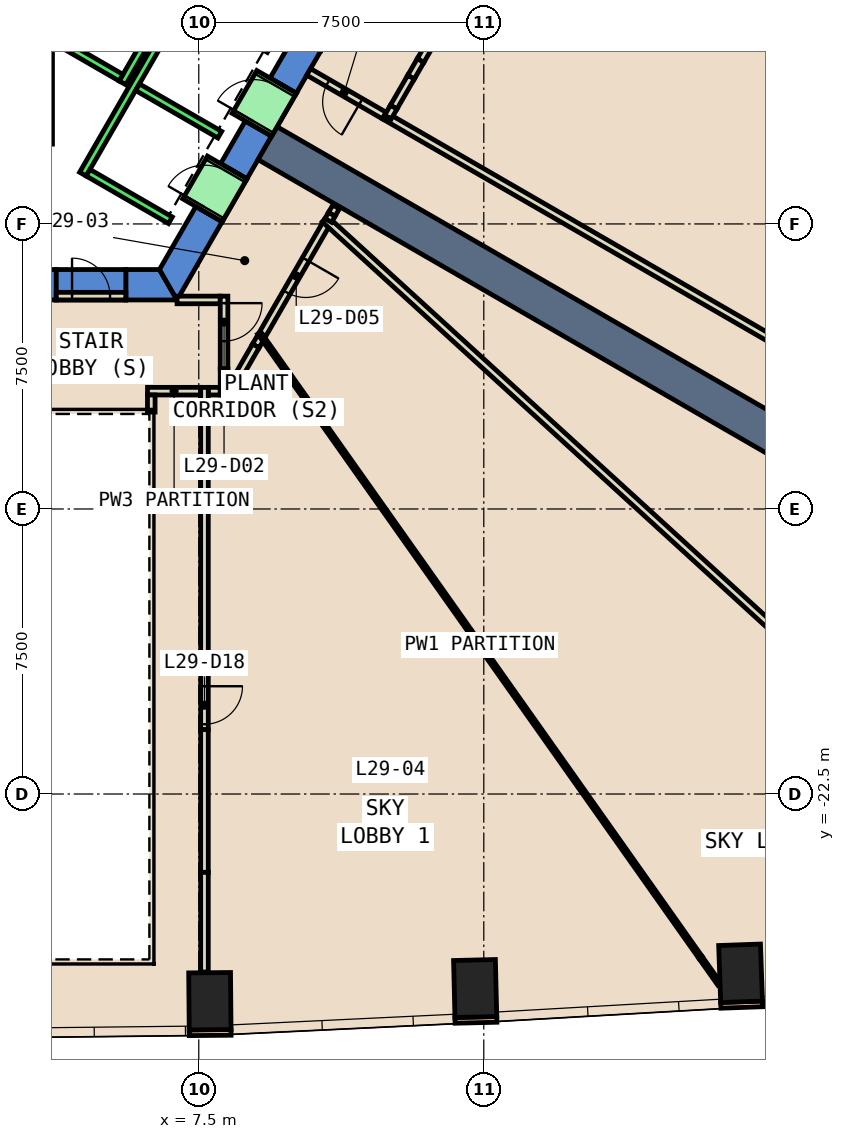
"""IFC4 building model, lengths in metres.
Left out: names, types, materials, properties, quantities, classifications, styles, units other than length and angle.
Written with IfcOpenShell. Run it as: python <this file> out.ifc"""

import sys

from ifc_helpers import new_model, si_unit, direction, frame, frame_2d, origin, origin_2d, place, context, subcontext, project, spatial, polyline, rectangle, outline, extrude, element, fill, save


model = new_model("IFC4")
c1 = context("Model", 3, precision=1e-05, world=origin(), true_north=direction((0.0, 1.0)))
c2 = subcontext(c1, "Body", "Model", "MODEL_VIEW")
j1 = project(units=[si_unit("LENGTHUNIT", "METRE"), si_unit("PLANEANGLEUNIT", "RADIAN")], contexts=[c1])
p1 = place(None, origin())
s1 = spatial("IfcSite", under=j1, at=p1, CompositionType="ELEMENT")
p2 = place(p1, origin())
s2 = spatial("IfcBuilding", under=s1, at=p2, CompositionType="ELEMENT")
p3 = place(p2, frame((0.0, 0.0, 132.8)))
s3 = spatial("IfcBuildingStorey", under=s2, at=p3, CompositionType="ELEMENT", Elevation=132.8)
for number, where, z_axis, x_axis in (
    (1, (7.792, -27.952, -0.6), (0.0, 0.0, 1.0), (1.0, 0.009, 0.0)),
    (2, (14.773, -27.618, -0.6), (0.0, 0.0, 1.0), (1.0, 0.024, 0.0)),
    (3, (21.757, -27.217, -0.6), (0.0, 0.0, 1.0), (0.999, 0.035, 0.0)),
):
    element("IfcColumn", number, at=place(p3, frame(where, z_axis=z_axis, x_axis=x_axis)), inside=s3, PredefinedType="COLUMN", context=c2, shape_type="SweptSolid", body=[
        extrude(rectangle(XDim=1.1, YDim=1.5, at=origin_2d()), origin(), (0.0, 0.0, 1.0), 5.4),
    ])
p4 = place(p3, frame((0.0, 0.0, -0.6)))
e4 = element("IfcWall", 4, at=p4, inside=s3, PredefinedType="SHEAR", context=c2, shape_type="SweptSolid", body=[
    extrude(outline(polyline([(3.75, -9.5), (3.75, -8.7), (-6.466, -8.7), (-6.928, -9.5), (3.75, -9.5)])), origin(), (0.0, 0.0, 1.0), 5.4),
])
p5 = place(p3, frame((0.0, 0.0, -0.6)))
e5 = element("IfcWall", 5, at=p5, inside=s3, PredefinedType="SHEAR", context=c2, shape_type="SweptSolid", body=[
    extrude(outline(polyline([(5.58, -8.7), (5.58, -9.5), (6.928, -9.5), (6.466, -8.7), (5.58, -8.7)])), origin(), (0.0, 0.0, 1.0), 5.4),
])
p6 = place(p3, frame((0.0, 0.0, 3.6)))
e6 = element("IfcWall", 6, at=p6, inside=s3, PredefinedType="SHEAR", context=c2, shape_type="SweptSolid", body=[
    extrude(outline(polyline([(5.58, -9.5), (5.58, -8.7), (3.75, -8.7), (3.75, -9.5), (5.58, -9.5)])), origin(), (0.0, 0.0, 1.0), 1.2),
])
p7 = place(p3, frame((0.0, 0.0, -0.6)))
e7 = element("IfcWall", 7, at=p7, inside=s3, PredefinedType="SHEAR", context=c2, shape_type="SweptSolid", body=[
    extrude(outline(polyline([(8.117, -7.44), (7.424, -7.04), (6.466, -8.7), (6.928, -9.5), (8.117, -7.44)])), origin(), (0.0, 0.0, 1.0), 5.4),
])
p8 = place(p3, frame((0.0, 0.0, -0.6)))
e8 = element("IfcWall", 8, at=p8, inside=s3, PredefinedType="SHEAR", context=c2, shape_type="SweptSolid", body=[
    extrude(outline(polyline([(9.417, -5.189), (8.724, -4.789), (8.075, -5.914), (8.767, -6.314), (9.417, -5.189)])), origin(), (0.0, 0.0, 1.0), 5.4),
])
p9 = place(p3, frame((0.0, 0.0, -0.6)))
e9 = element("IfcWall", 9, at=p9, inside=s3, PredefinedType="SHEAR", context=c2, shape_type="SweptSolid", body=[
    extrude(outline(polyline([(10.717, -2.937), (10.025, -2.537), (9.374, -3.663), (10.067, -4.063), (10.717, -2.937)])), origin(), (0.0, 0.0, 1.0), 5.4),
])
p10 = place(p3, frame((0.0, 0.0, 3.6)))
e10 = element("IfcWall", 10, at=p10, inside=s3, PredefinedType="SHEAR", context=c2, shape_type="SweptSolid", body=[
    extrude(outline(polyline([(8.767, -6.314), (8.075, -5.914), (7.424, -7.04), (8.117, -7.44), (8.767, -6.314)])), origin(), (0.0, 0.0, 1.0), 1.2),
])
p11 = place(p3, frame((0.0, 0.0, 3.6)))
e11 = element("IfcWall", 11, at=p11, inside=s3, PredefinedType="SHEAR", context=c2, shape_type="SweptSolid", body=[
    extrude(outline(polyline([(10.067, -4.063), (9.374, -3.663), (8.724, -4.789), (9.417, -5.189), (10.067, -4.063)])), origin(), (0.0, 0.0, 1.0), 1.2),
])
p12 = place(p3, frame((9.31, -5.375, 0.0), z_axis=(0.0, 0.0, 1.0), x_axis=(0.86602173752, -0.500006350103, 0.0)))
e12 = element("IfcWall", 12, at=p12, inside=s3, PredefinedType="SHEAR", context=c2, shape_type="SweptSolid", body=[
    extrude(rectangle(XDim=31.463, YDim=1.0, at=frame_2d((15.732, 0.0))), origin(), (0.0, 0.0, 1.0), 4.8),
])
p13 = place(p3, frame((7.249, -28.782, 0.0), z_axis=(0.0, 0.0, 1.0), x_axis=(0.99995860686, 0.009098602504, 0.0)))
e13 = element("IfcWall", 13, at=p13, inside=s3, PredefinedType="STANDARD", context=c2, shape_type="SweptSolid", body=[
    extrude(rectangle(XDim=1.1, YDim=0.15, at=frame_2d((0.55, 0.0))), origin(), (0.0, 0.0, 1.0), 4.8),
])
p14 = place(p3, frame((14.243, -28.456, 0.0), z_axis=(0.0, 0.0, 1.0), x_axis=(0.999718180159, 0.023739424163, 0.0)))
e14 = element("IfcWall", 14, at=p14, inside=s3, PredefinedType="STANDARD", context=c2, shape_type="SweptSolid", body=[
    extrude(rectangle(XDim=1.1, YDim=0.15, at=frame_2d((0.55, 0.0))), origin(), (0.0, 0.0, 1.0), 4.8),
])
p15 = place(p3, frame((21.237, -28.061, 0.0), z_axis=(0.0, 0.0, 1.0), x_axis=(0.999368780235, 0.035525217693, 0.0)))
e15 = element("IfcWall", 15, at=p15, inside=s3, PredefinedType="STANDARD", context=c2, shape_type="SweptSolid", body=[
    extrude(rectangle(XDim=1.1, YDim=0.15, at=frame_2d((0.55, 0.0))), origin(), (0.0, 0.0, 1.0), 4.8),
])
p16 = place(p3, frame((7.55, -11.9, 0.0), z_axis=(0.0, 0.0, 1.0), x_axis=(-1.0, 0.0, 0.0)))
e16 = element("IfcWall", 16, at=p16, inside=s3, PredefinedType="PARTITIONING", context=c2, shape_type="SweptSolid", body=[
    extrude(rectangle(XDim=1.399, YDim=0.2, at=frame_2d((0.7, 0.0))), origin(), (0.0, 0.0, 1.0), 4.8),
])
p17 = place(p3, frame((6.25, -12.0, 0.0), z_axis=(0.0, 0.0, 1.0), x_axis=(0.0, -1.0, 0.0)))
e17 = element("IfcWall", 17, at=p17, inside=s3, PredefinedType="PARTITIONING", context=c2, shape_type="SweptSolid", body=[
    extrude(rectangle(XDim=0.45, YDim=0.2, at=frame_2d((0.225, 0.0))), origin(), (0.0, 0.0, 1.0), 4.8),
])
p18 = place(p3, frame((6.928, -9.5, 0.0), z_axis=(0.0, 0.0, 1.0), x_axis=(1.0, 0.0, 0.0)))
e18 = element("IfcWall", 18, at=p18, inside=s3, PredefinedType="PARTITIONING", context=c2, shape_type="SweptSolid", body=[
    extrude(rectangle(XDim=1.137, YDim=0.2, at=frame_2d((0.568, 0.0))), origin(), (0.0, 0.0, 1.0), 2.4),
])
p19 = place(p3, frame((8.165, -9.4, 0.0), z_axis=(0.0, 0.0, 1.0), x_axis=(0.0, -1.0, 0.0)))
e19 = element("IfcWall", 19, at=p19, inside=s3, PredefinedType="PARTITIONING", context=c2, shape_type="SweptSolid", body=[
    extrude(rectangle(XDim=1.914, YDim=0.2, at=frame_2d((0.957, 0.0))), origin(), (0.0, 0.0, 1.0), 2.4),
])
p20 = place(p19, frame((0.184, 0.0, 0.0)))
e20 = element("IfcOpeningElement", 20, at=p20, cuts=e19, PredefinedType="OPENING", context=c2, shape_type="SweptSolid", body=[
    extrude(rectangle(XDim=1.0, YDim=2.1, at=frame_2d((0.5, 1.05))), frame((0.0, 0.11, 0.0), z_axis=(0.0, -1.0, 0.0), x_axis=(1.0, 0.0, 0.0)), (0.0, 0.0, 1.0), 0.22),
])
p21 = place(p3, frame((8.065, -11.9, 0.0), z_axis=(0.0, 0.0, 1.0), x_axis=(-1.0, 0.0, 0.0)))
e21 = element("IfcWall", 21, at=p21, inside=s3, PredefinedType="PARTITIONING", context=c2, shape_type="SweptSolid", body=[
    extrude(rectangle(XDim=0.315, YDim=0.2, at=frame_2d((0.157, 0.0))), origin(), (0.0, 0.0, 1.0), 4.8),
])
p22 = place(p3, frame((7.65, -11.8, 0.0), z_axis=(0.0, 0.0, 1.0), x_axis=(0.0, -1.0, 0.0)))
e22 = element("IfcWall", 22, at=p22, inside=s3, PredefinedType="PARTITIONING", context=c2, shape_type="SweptSolid", body=[
    extrude(rectangle(XDim=9.006, YDim=0.2, at=frame_2d((4.503, 0.0))), origin(), (0.0, 0.0, 1.0), 4.8),
])
p23 = place(p22, frame((7.864, 0.0, 0.0)))
e23 = element("IfcOpeningElement", 23, at=p23, cuts=e22, PredefinedType="OPENING", context=c2, shape_type="SweptSolid", body=[
    extrude(rectangle(XDim=1.0, YDim=2.1, at=frame_2d((0.5, 1.05))), frame((0.0, 0.11, 0.0), z_axis=(0.0, -1.0, 0.0), x_axis=(1.0, 0.0, 0.0)), (0.0, 0.0, 1.0), 0.22),
])
p24 = place(p3, frame((9.145, -10.46, 0.0), z_axis=(0.0, 0.0, 1.0), x_axis=(-0.500701704226, -0.865619895442, 0.0)))
e24 = element("IfcWall", 24, at=p24, inside=s3, PredefinedType="PARTITIONING", context=c2, shape_type="SweptSolid", body=[
    extrude(rectangle(XDim=0.288, YDim=0.2, at=frame_2d((0.144, 0.0))), origin(), (0.0, 0.0, 1.0), 4.8),
])
p25 = place(p3, frame((10.89, -7.437, 0.0), z_axis=(0.0, 0.0, 1.0), x_axis=(-0.499905227862, -0.86608011359, 0.0)))
e25 = element("IfcWall", 25, at=p25, inside=s3, PredefinedType="PARTITIONING", context=c2, shape_type="SweptSolid", body=[
    extrude(rectangle(XDim=3.43, YDim=0.2, at=frame_2d((1.715, 0.0))), origin(), (0.0, 0.0, 1.0), 4.8),
])
p26 = place(p25, frame((1.152, 0.0, 0.0)))
e26 = element("IfcOpeningElement", 26, at=p26, cuts=e25, PredefinedType="OPENING", context=c2, shape_type="SweptSolid", body=[
    extrude(rectangle(XDim=1.0, YDim=2.1, at=frame_2d((0.5, 1.05))), frame((0.0, 0.11, 0.0), z_axis=(0.0, -1.0, 0.0), x_axis=(1.0, 0.0, 0.0)), (0.0, 0.0, 1.0), 0.22),
])
p27 = place(p3, frame((11.113, -7.051, 0.0), z_axis=(0.0, 0.0, 1.0), x_axis=(-0.499504513693, -0.866311284008, 0.0)))
e27 = element("IfcWall", 27, at=p27, inside=s3, PredefinedType="PARTITIONING", context=c2, shape_type="SweptSolid", body=[
    extrude(rectangle(XDim=0.226, YDim=0.2, at=frame_2d((0.113, 0.0))), origin(), (0.0, 0.0, 1.0), 2.1),
])
p28 = place(p3, frame((9.092, -10.37, 0.0), z_axis=(0.0, 0.0, 1.0), x_axis=(0.577122389033, -0.816657668841, 0.0)))
e28 = element("IfcWall", 28, at=p28, inside=s3, PredefinedType="PARTITIONING", context=c2, shape_type="SweptSolid", body=[
    extrude(rectangle(XDim=20.118, YDim=0.1, at=frame_2d((10.059, 0.0))), origin(), (0.0, 0.0, 1.0), 4.8),
])
p29 = place(p3, frame((10.816, -7.37, 0.0), z_axis=(0.0, 0.0, 1.0), x_axis=(0.738728492096, -0.674003126822, 0.0)))
e29 = element("IfcWall", 29, at=p29, inside=s3, PredefinedType="PARTITIONING", context=c2, shape_type="SweptSolid", body=[
    extrude(rectangle(XDim=27.445, YDim=0.2, at=frame_2d((13.722, 0.0))), origin(), (0.0, 0.0, 1.0), 4.8),
])
p30 = place(p3, frame((12.384, -4.65, 0.0), z_axis=(0.0, 0.0, 1.0), x_axis=(-0.866053019151, 0.499952165731, 0.0)))
e30 = element("IfcWall", 30, at=p30, inside=s3, PredefinedType="PARTITIONING", context=c2, shape_type="SweptSolid", body=[
    extrude(rectangle(XDim=2.3, YDim=0.2, at=frame_2d((1.15, 0.0))), origin(), (0.0, 0.0, 1.0), 4.8),
])
p31 = place(p30, frame((0.721, 0.0, 0.0)))
e31 = element("IfcOpeningElement", 31, at=p31, cuts=e30, PredefinedType="OPENING", context=c2, shape_type="SweptSolid", body=[
    extrude(rectangle(XDim=1.0, YDim=2.1, at=frame_2d((0.5, 1.05))), frame((0.0, 0.11, 0.0), z_axis=(0.0, -1.0, 0.0), x_axis=(1.0, 0.0, 0.0)), (0.0, 0.0, 1.0), 0.22),
])
p32 = place(p3, frame((12.384, -4.65, 0.0), z_axis=(0.0, 0.0, 1.0), x_axis=(0.866033509011, -0.499985961072, 0.0)))
e32 = element("IfcWall", 32, at=p32, inside=s3, PredefinedType="PARTITIONING", context=c2, shape_type="SweptSolid", body=[
    extrude(rectangle(XDim=29.487, YDim=0.2, at=frame_2d((14.744, 0.0))), origin(), (0.0, 0.0, 1.0), 4.8),
])
p33 = place(p3, frame((3.75, -9.4, 0.0), z_axis=(0.0, 0.0, 1.0), x_axis=(1.0, 0.0, 0.0)))
e33 = element("IfcWall", 33, at=p33, inside=s3, PredefinedType="PARTITIONING", context=c2, shape_type="SweptSolid", body=[
    extrude(rectangle(XDim=1.83, YDim=0.2, at=frame_2d((0.915, 0.0))), origin(), (0.0, 0.0, 1.0), 2.4),
])
p34 = place(p33, frame((0.415, 0.0, 0.0)))
e34 = element("IfcOpeningElement", 34, at=p34, cuts=e33, PredefinedType="OPENING", context=c2, shape_type="SweptSolid", body=[
    extrude(rectangle(XDim=1.0, YDim=2.1, at=frame_2d((0.5, 1.05))), frame((0.0, 0.11, 0.0), z_axis=(0.0, -1.0, 0.0), x_axis=(1.0, 0.0, 0.0)), (0.0, 0.0, 1.0), 0.22),
])
p35 = place(p3, frame((8.165, -11.314, 0.0), z_axis=(0.0, 0.0, 1.0), x_axis=(0.0, -1.0, 0.0)))
e35 = element("IfcWall", 35, at=p35, inside=s3, PredefinedType="PARTITIONING", context=c2, shape_type="SweptSolid", body=[
    extrude(rectangle(XDim=0.686, YDim=0.2, at=frame_2d((0.343, 0.0))), origin(), (0.0, 0.0, 1.0), 4.8),
])
p36 = place(p3, frame((7.65, -20.806, 0.0), z_axis=(0.0, 0.0, 1.0), x_axis=(0.0, -1.0, 0.0)))
e36 = element("IfcWall", 36, at=p36, inside=s3, PredefinedType="PARTITIONING", context=c2, shape_type="SweptSolid", body=[
    extrude(rectangle(XDim=3.755, YDim=0.2, at=frame_2d((1.877, 0.0))), origin(), (0.0, 0.0, 1.0), 2.4),
])
p37 = place(p3, frame((7.65, -24.561, 0.0), z_axis=(0.0, 0.0, 1.0), x_axis=(0.0, -1.0, 0.0)))
e37 = element("IfcWall", 37, at=p37, inside=s3, PredefinedType="PARTITIONING", context=c2, shape_type="SweptSolid", body=[
    extrude(rectangle(XDim=2.622, YDim=0.2, at=frame_2d((1.311, 0.0))), origin(), (0.0, 0.0, 1.0), 4.8),
])
p38 = place(p3, frame((9.001, -10.709, 0.0), z_axis=(0.0, 0.0, 1.0), x_axis=(-0.499753940741, -0.866167419564, 0.0)))
e38 = element("IfcWall", 38, at=p38, inside=s3, PredefinedType="PARTITIONING", context=c2, shape_type="SweptSolid", body=[
    extrude(rectangle(XDim=1.119, YDim=0.2, at=frame_2d((0.559, 0.0))), origin(), (0.0, 0.0, 1.0), 2.4),
])
p39 = place(p3, frame((8.442, -11.678, 0.0), z_axis=(0.0, 0.0, 1.0), x_axis=(-0.499011179969, -0.866595547107, 0.0)))
e39 = element("IfcWall", 39, at=p39, inside=s3, PredefinedType="PARTITIONING", context=c2, shape_type="SweptSolid", body=[
    extrude(rectangle(XDim=0.357, YDim=0.2, at=frame_2d((0.178, 0.0))), origin(), (0.0, 0.0, 1.0), 4.8),
])
p40 = place(p3, frame((11.0, -7.247, 0.0), z_axis=(0.0, 0.0, 1.0), x_axis=(-0.498843983803, -0.866691802098, 0.0)))
e40 = element("IfcWall", 40, at=p40, inside=s3, PredefinedType="PARTITIONING", context=c2, shape_type="SweptSolid", body=[
    extrude(rectangle(XDim=0.185, YDim=0.2, at=frame_2d((0.092, 0.0))), origin(), (0.0, 0.0, 1.0), 4.8),
])
p41 = place(p3, frame((20.703, -26.8, 0.0), z_axis=(0.0, 0.0, 1.0), x_axis=(0.577265327721, -0.816556636989, 0.0)))
e41 = element("IfcWall", 41, at=p41, inside=s3, PredefinedType="PARTITIONING", context=c2, shape_type="SweptSolid", body=[
    extrude(rectangle(XDim=0.856, YDim=0.1, at=frame_2d((0.428, 0.0))), origin(), (0.0, 0.0, 1.0), 2.4),
])
p42 = place(p3, frame((13.806, -2.387, 0.0), z_axis=(0.0, 0.0, 1.0), x_axis=(-0.499572668549, -0.866271983178, 0.0)))
e42 = element("IfcWall", 42, at=p42, inside=s3, PredefinedType="PARTITIONING", context=c2, shape_type="SweptSolid", body=[
    extrude(rectangle(XDim=0.941, YDim=0.2, at=frame_2d((0.47, 0.0))), origin(), (0.0, 0.0, 1.0), 2.4),
])
p43 = place(p3, frame((13.336, -3.202, 0.0), z_axis=(0.0, 0.0, 1.0), x_axis=(-0.499694399542, -0.866201770413, 0.0)))
e43 = element("IfcWall", 43, at=p43, inside=s3, PredefinedType="PARTITIONING", context=c2, shape_type="SweptSolid", body=[
    extrude(rectangle(XDim=0.502, YDim=0.2, at=frame_2d((0.251, 0.0))), origin(), (0.0, 0.0, 1.0), 4.8),
])
p44 = place(p3, frame((13.085, -3.637, 0.0), z_axis=(0.0, 0.0, 1.0), x_axis=(-0.500402557727, -0.865792862191, 0.0)))
e44 = element("IfcWall", 44, at=p44, inside=s3, PredefinedType="PARTITIONING", context=c2, shape_type="SweptSolid", body=[
    extrude(rectangle(XDim=0.911, YDim=0.2, at=frame_2d((0.456, 0.0))), origin(), (0.0, 0.0, 1.0), 2.1),
])
p45 = place(p3, frame((12.629, -4.426, 0.0), z_axis=(0.0, 0.0, 1.0), x_axis=(-0.500493465029, -0.865740314103, 0.0)))
e45 = element("IfcWall", 45, at=p45, inside=s3, PredefinedType="PARTITIONING", context=c2, shape_type="SweptSolid", body=[
    extrude(rectangle(XDim=0.302, YDim=0.2, at=frame_2d((0.151, 0.0))), origin(), (0.0, 0.0, 1.0), 4.8),
])
p46 = place(p3, frame((5.492, -3.788, 0.0), z_axis=(0.0, 0.0, 1.0), x_axis=(0.500011755427, 0.866018616679, 0.0)))
e46 = element("IfcWall", 46, at=p46, inside=s3, PredefinedType="STANDARD", context=c2, shape_type="SweptSolid", body=[
    extrude(rectangle(XDim=2.8, YDim=0.2, at=frame_2d((1.4, 0.0))), origin(), (0.0, 0.0, 1.0), 4.8),
])
p47 = place(p3, frame((3.377, -2.452, 0.0), z_axis=(0.0, 0.0, 1.0), x_axis=(0.865955154139, -0.50012165622, 0.0)))
e47 = element("IfcWall", 47, at=p47, inside=s3, PredefinedType="STANDARD", context=c2, shape_type="SweptSolid", body=[
    extrude(rectangle(XDim=2.4, YDim=0.2, at=frame_2d((1.2, 0.0))), origin(), (0.0, 0.0, 1.0), 4.8),
])
p48 = place(p3, frame((4.451, -6.19, 0.0), z_axis=(0.0, 0.0, 1.0), x_axis=(0.50000090737, 0.866024879913, 0.0)))
e48 = element("IfcWall", 48, at=p48, inside=s3, PredefinedType="STANDARD", context=c2, shape_type="SweptSolid", body=[
    extrude(rectangle(XDim=10.6, YDim=0.2, at=frame_2d((5.3, 0.0))), origin(), (0.0, 0.0, 1.0), 4.8),
])
for number, where, z_axis, x_axis in (
    (49, (4.588, -6.153, 0.0), (0.0, 0.0, 1.0), (0.866, -0.5, 0.0)),
    (50, (5.888, -3.902, 0.0), (0.0, 0.0, 1.0), (0.866, -0.5, 0.0)),
):
    element("IfcWall", number, at=place(p3, frame(where, z_axis=z_axis, x_axis=x_axis)), inside=s3, PredefinedType="STANDARD", context=c2, shape_type="SweptSolid", body=[
        extrude(rectangle(XDim=2.5, YDim=0.2, at=frame_2d((1.25, 0.0))), origin(), (0.0, 0.0, 1.0), 4.8),
    ])
p49 = place(p3, frame((7.598, -7.14, 0.0), z_axis=(0.0, 0.0, 1.0), x_axis=(0.500362116554, 0.865816234728, 0.0)))
e51 = element("IfcWall", 51, at=p49, inside=s3, PredefinedType="STANDARD", context=c2, shape_type="SweptSolid", body=[
    extrude(rectangle(XDim=1.299, YDim=1.2, at=frame_2d((0.65, 0.0))), origin(), (0.0, 0.0, 1.0), 2.4),
])
p50 = place(p49, frame((0.1, 0.0, 0.0)))
e52 = element("IfcOpeningElement", 52, at=p50, cuts=e51, PredefinedType="OPENING", context=c2, shape_type="SweptSolid", body=[
    extrude(rectangle(XDim=1.1, YDim=2.3, at=frame_2d((0.55, 1.15))), frame((0.0, 0.61, 0.0), z_axis=(0.0, -1.0, 0.0), x_axis=(1.0, 0.0, 0.0)), (0.0, 0.0, 1.0), 1.22),
])
p51 = place(p3, frame((8.898, -4.889, 0.0), z_axis=(0.0, 0.0, 1.0), x_axis=(0.500036693733, 0.866004217611, 0.0)))
e53 = element("IfcWall", 53, at=p51, inside=s3, PredefinedType="STANDARD", context=c2, shape_type="SweptSolid", body=[
    extrude(rectangle(XDim=1.3, YDim=1.2, at=frame_2d((0.65, 0.0))), origin(), (0.0, 0.0, 1.0), 2.4),
])
p52 = place(p51, frame((0.1, 0.0, 0.0)))
e54 = element("IfcOpeningElement", 54, at=p52, cuts=e53, PredefinedType="OPENING", context=c2, shape_type="SweptSolid", body=[
    extrude(rectangle(XDim=1.1, YDim=2.3, at=frame_2d((0.55, 1.15))), frame((0.0, 0.61, 0.0), z_axis=(0.0, -1.0, 0.0), x_axis=(1.0, 0.0, 0.0)), (0.0, 0.0, 1.0), 1.22),
])
p53 = place(p3, frame((3.55, -2.667, 0.0), z_axis=(0.0, 0.0, 1.0), x_axis=(0.0, -1.0, 0.0)))
e55 = element("IfcWall", 55, at=p53, inside=s3, PredefinedType="STANDARD", context=c2, shape_type="SweptSolid", body=[
    extrude(rectangle(XDim=2.733, YDim=0.2, at=frame_2d((1.366, 0.0))), origin(), (0.0, 0.0, 1.0), 4.8),
])
p54 = place(p20, origin())
e56 = element("IfcDoor", 56, at=p54, inside=s3, OperationType="SINGLE_SWING_RIGHT", PredefinedType="DOOR", context=c2, shape_type="SweptSolid", body=[
    extrude(rectangle(XDim=1.0, YDim=2.1, at=frame_2d((0.5, 1.05))), frame((0.0, 0.025, 0.0), z_axis=(0.0, -1.0, 0.0), x_axis=(1.0, 0.0, 0.0)), (0.0, 0.0, 1.0), 0.05),
])
fill(e20, e56)
p55 = place(p26, origin())
e57 = element("IfcDoor", 57, at=p55, inside=s3, OperationType="SINGLE_SWING_LEFT", PredefinedType="DOOR", context=c2, shape_type="SweptSolid", body=[
    extrude(rectangle(XDim=1.0, YDim=2.1, at=frame_2d((0.5, 1.05))), frame((0.0, 0.025, 0.0), z_axis=(0.0, -1.0, 0.0), x_axis=(1.0, 0.0, 0.0)), (0.0, 0.0, 1.0), 0.05),
])
fill(e26, e57)
p56 = place(p23, origin())
e58 = element("IfcDoor", 58, at=p56, inside=s3, OperationType="SINGLE_SWING_RIGHT", PredefinedType="DOOR", context=c2, shape_type="SweptSolid", body=[
    extrude(rectangle(XDim=1.0, YDim=2.1, at=frame_2d((0.5, 1.05))), frame((0.0, 0.025, 0.0), z_axis=(0.0, -1.0, 0.0), x_axis=(1.0, 0.0, 0.0)), (0.0, 0.0, 1.0), 0.05),
])
fill(e23, e58)
p57 = place(p31, origin())
e59 = element("IfcDoor", 59, at=p57, inside=s3, OperationType="SINGLE_SWING_LEFT", PredefinedType="DOOR", context=c2, shape_type="SweptSolid", body=[
    extrude(rectangle(XDim=1.0, YDim=2.1, at=frame_2d((0.5, 1.05))), frame((0.0, 0.025, 0.0), z_axis=(0.0, -1.0, 0.0), x_axis=(1.0, 0.0, 0.0)), (0.0, 0.0, 1.0), 0.05),
])
fill(e31, e59)
p58 = place(p34, origin())
e60 = element("IfcDoor", 60, at=p58, inside=s3, OperationType="SINGLE_SWING_LEFT", PredefinedType="DOOR", context=c2, shape_type="SweptSolid", body=[
    extrude(rectangle(XDim=1.0, YDim=2.1, at=frame_2d((0.5, 1.05))), frame((0.0, 0.025, 0.0), z_axis=(0.0, -1.0, 0.0), x_axis=(1.0, 0.0, 0.0)), (0.0, 0.0, 1.0), 0.05),
])
fill(e34, e60)
p59 = place(p50, origin())
e61 = element("IfcDoor", 61, at=p59, inside=s3, OperationType="SLIDING_TO_LEFT", PredefinedType="DOOR", context=c2, shape_type="SweptSolid", body=[
    extrude(rectangle(XDim=1.1, YDim=2.3, at=frame_2d((0.55, 1.15))), frame((0.0, 0.025, 0.0), z_axis=(0.0, -1.0, 0.0), x_axis=(1.0, 0.0, 0.0)), (0.0, 0.0, 1.0), 0.05),
])
fill(e52, e61)
p60 = place(p52, origin())
e62 = element("IfcDoor", 62, at=p60, inside=s3, OperationType="SLIDING_TO_LEFT", PredefinedType="DOOR", context=c2, shape_type="SweptSolid", body=[
    extrude(rectangle(XDim=1.1, YDim=2.3, at=frame_2d((0.55, 1.15))), frame((0.0, 0.025, 0.0), z_axis=(0.0, -1.0, 0.0), x_axis=(1.0, 0.0, 0.0)), (0.0, 0.0, 1.0), 0.05),
])
fill(e54, e62)
save(model, sys.argv[1])
